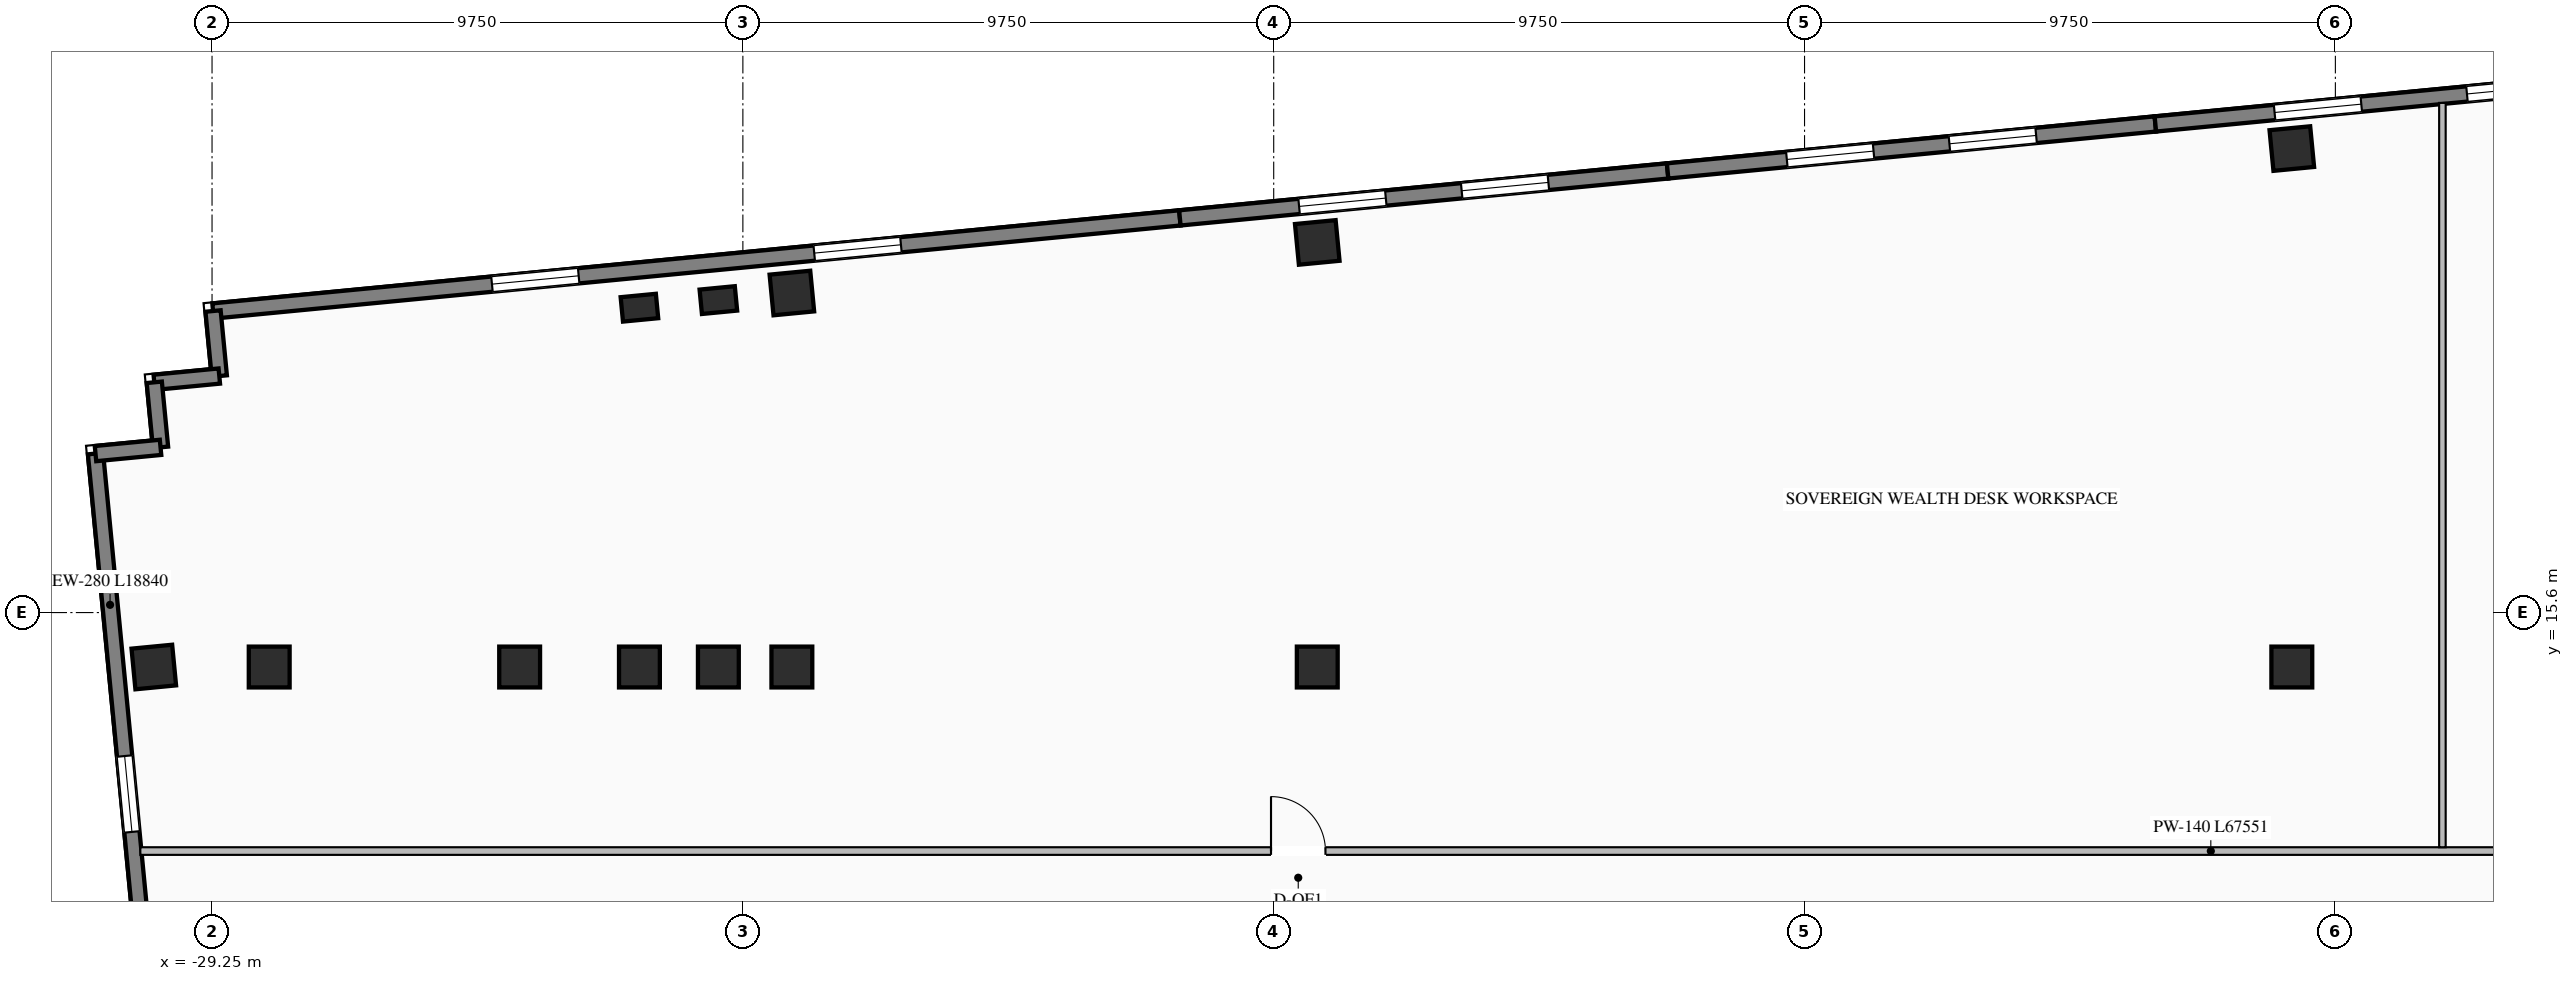
"""IFC4 building model, lengths in metres.
Left out: names, types, materials, properties, quantities, classifications, styles, units other than length and angle.
Written with IfcOpenShell. Run it as: python <this file> out.ifc"""

import sys

from ifc_helpers import new_model, si_unit, direction, frame, frame_2d, origin, origin_2d, place, context, subcontext, project, spatial, rectangle, i_section, extrude, element, fill, save


model = new_model("IFC4")
c1 = context("Model", 3, precision=1e-05, world=origin(), true_north=direction((0.0, 1.0)))
c2 = subcontext(c1, "Body", "Model", "MODEL_VIEW")
j1 = project(units=[si_unit("LENGTHUNIT", "METRE"), si_unit("PLANEANGLEUNIT", "RADIAN")], contexts=[c1])
p1 = place(None, origin())
s1 = spatial("IfcSite", under=j1, at=p1, CompositionType="ELEMENT")
p2 = place(p1, origin())
s2 = spatial("IfcBuilding", under=s1, at=p2, CompositionType="ELEMENT")
p3 = place(p2, frame((0.0, 0.0, 108.7)))
s3 = spatial("IfcBuildingStorey", under=s2, at=p3, CompositionType="ELEMENT", Elevation=108.7)
for number, where, z_axis, x_axis in (
    (1, (-21.4, 14.6, 0.0), (0.0, 0.0, 1.0), (1.0, 0.0, 0.0)),
    (2, (-19.95, 14.6, 0.0), (0.0, 0.0, 1.0), (1.0, 0.0, 0.0)),
    (3, (-18.6, 14.6, 0.0), (0.0, 0.0, 1.0), (1.0, 0.0, 0.0)),
    (4, (-8.95, 14.6, 0.0), (0.0, 0.0, 1.0), (1.0, 0.0, 0.0)),
    (5, (8.95, 14.6, 0.0), (0.0, 0.0, 1.0), (1.0, 0.0, 0.0)),
    (6, (-23.6, 14.6, 0.0), (0.0, 0.0, 1.0), (1.0, 0.0, 0.0)),
    (7, (-28.2, 14.6, 0.0), (0.0, 0.0, 1.0), (1.0, 0.0, 0.0)),
    (8, (-18.6, 21.469, 0.0), (0.0, 0.0, 1.0), (0.995, 0.096, 0.0)),
    (9, (-8.95, 22.398, 0.0), (0.0, 0.0, 1.0), (0.995, 0.096, 0.0)),
    (10, (8.95, 24.122, 0.0), (0.0, 0.0, 1.0), (0.995, 0.096, 0.0)),
    (11, (-30.32, 14.6, 0.0), (0.0, 0.0, 1.0), (0.995, 0.096, 0.0)),
):
    element("IfcColumn", number, at=place(p3, frame(where, z_axis=z_axis, x_axis=x_axis)), inside=s3, PredefinedType="COLUMN", context=c2, shape_type="SweptSolid", body=[
        extrude(i_section(OverallWidth=0.75, OverallDepth=0.75, WebThickness=0.03, FlangeThickness=0.044, at=origin_2d()), origin(), (0.0, 0.0, 1.0), 3.45),
    ])
for number, where, z_axis, x_axis in (
    (12, (-21.4, 21.199, 0.0), (0.0, 0.0, 1.0), (0.995, 0.096, 0.0)),
    (13, (-19.95, 21.339, 0.0), (0.0, 0.0, 1.0), (0.995, 0.096, 0.0)),
):
    element("IfcColumn", number, at=place(p3, frame(where, z_axis=z_axis, x_axis=x_axis)), inside=s3, PredefinedType="PILASTER", context=c2, shape_type="SweptSolid", body=[
        extrude(rectangle(XDim=0.65, YDim=0.45, at=origin_2d()), origin(), (0.0, 0.0, 1.0), 3.45),
    ])
p4 = place(p3, frame((-29.231, 21.138, 0.0), z_axis=(0.0, 0.0, 1.0), x_axis=(0.995395780835, 0.095850088663, 0.0)))
e14 = element("IfcWall", 14, at=p4, inside=s3, PredefinedType="STANDARD", context=c2, shape_type="SweptSolid", body=[
    extrude(rectangle(XDim=17.84, YDim=0.28, at=frame_2d((8.92, 0.0))), origin(), (0.0, 0.0, 1.0), 3.15),
])
p5 = place(p4, frame((5.147, 0.0, 0.76)))
e15 = element("IfcOpeningElement", 15, at=p5, cuts=e14, PredefinedType="OPENING", context=c2, shape_type="SweptSolid", body=[
    extrude(rectangle(XDim=1.6, YDim=1.95, at=frame_2d((0.8, 0.975))), frame((0.0, 0.15, 0.0), z_axis=(0.0, -1.0, 0.0), x_axis=(1.0, 0.0, 0.0)), (0.0, 0.0, 1.0), 0.3),
])
p6 = place(p4, frame((11.093, 0.0, 0.76)))
e16 = element("IfcOpeningElement", 16, at=p6, cuts=e14, PredefinedType="OPENING", context=c2, shape_type="SweptSolid", body=[
    extrude(rectangle(XDim=1.6, YDim=1.95, at=frame_2d((0.8, 0.975))), frame((0.0, 0.15, 0.0), z_axis=(0.0, -1.0, 0.0), x_axis=(1.0, 0.0, 0.0)), (0.0, 0.0, 1.0), 0.3),
])
p7 = place(p3, frame((-11.474, 22.848, 0.0), z_axis=(0.0, 0.0, 1.0), x_axis=(0.995396794462, 0.09583956164, 0.0)))
e17 = element("IfcWall", 17, at=p7, inside=s3, PredefinedType="STANDARD", context=c2, shape_type="SweptSolid", body=[
    extrude(rectangle(XDim=9.0, YDim=0.28, at=frame_2d((4.5, 0.0))), origin(), (0.0, 0.0, 1.0), 3.15),
])
p8 = place(p7, frame((2.2, 0.0, 0.76)))
e18 = element("IfcOpeningElement", 18, at=p8, cuts=e17, PredefinedType="OPENING", context=c2, shape_type="SweptSolid", body=[
    extrude(rectangle(XDim=1.6, YDim=1.95, at=frame_2d((0.8, 0.975))), frame((0.0, 0.15, 0.0), z_axis=(0.0, -1.0, 0.0), x_axis=(1.0, 0.0, 0.0)), (0.0, 0.0, 1.0), 0.3),
])
p9 = place(p7, frame((5.2, 0.0, 0.76)))
e19 = element("IfcOpeningElement", 19, at=p9, cuts=e17, PredefinedType="OPENING", context=c2, shape_type="SweptSolid", body=[
    extrude(rectangle(XDim=1.6, YDim=1.95, at=frame_2d((0.8, 0.975))), frame((0.0, 0.15, 0.0), z_axis=(0.0, -1.0, 0.0), x_axis=(1.0, 0.0, 0.0)), (0.0, 0.0, 1.0), 0.3),
])
p10 = place(p3, frame((-2.515, 23.711, 0.0), z_axis=(0.0, 0.0, 1.0), x_axis=(0.995397043619, 0.095836973841, 0.0)))
e20 = element("IfcWall", 20, at=p10, inside=s3, PredefinedType="STANDARD", context=c2, shape_type="SweptSolid", body=[
    extrude(rectangle(XDim=9.0, YDim=0.28, at=frame_2d((4.5, 0.0))), origin(), (0.0, 0.0, 1.0), 3.15),
])
p11 = place(p10, frame((2.2, 0.0, 0.76)))
e21 = element("IfcOpeningElement", 21, at=p11, cuts=e20, PredefinedType="OPENING", context=c2, shape_type="SweptSolid", body=[
    extrude(rectangle(XDim=1.6, YDim=1.95, at=frame_2d((0.8, 0.975))), frame((0.0, 0.15, 0.0), z_axis=(0.0, -1.0, 0.0), x_axis=(1.0, 0.0, 0.0)), (0.0, 0.0, 1.0), 0.3),
])
p12 = place(p10, frame((5.2, 0.0, 0.76)))
e22 = element("IfcOpeningElement", 22, at=p12, cuts=e20, PredefinedType="OPENING", context=c2, shape_type="SweptSolid", body=[
    extrude(rectangle(XDim=1.6, YDim=1.95, at=frame_2d((0.8, 0.975))), frame((0.0, 0.15, 0.0), z_axis=(0.0, -1.0, 0.0), x_axis=(1.0, 0.0, 0.0)), (0.0, 0.0, 1.0), 0.3),
])
p13 = place(p3, frame((6.444, 24.573, 0.0), z_axis=(0.0, 0.0, 1.0), x_axis=(0.995396794462, 0.09583956164, 0.0)))
e23 = element("IfcWall", 23, at=p13, inside=s3, PredefinedType="STANDARD", context=c2, shape_type="SweptSolid", body=[
    extrude(rectangle(XDim=9.0, YDim=0.28, at=frame_2d((4.5, 0.0))), origin(), (0.0, 0.0, 1.0), 3.15),
])
p14 = place(p13, frame((2.2, 0.0, 0.76)))
e24 = element("IfcOpeningElement", 24, at=p14, cuts=e23, PredefinedType="OPENING", context=c2, shape_type="SweptSolid", body=[
    extrude(rectangle(XDim=1.6, YDim=1.95, at=frame_2d((0.8, 0.975))), frame((0.0, 0.15, 0.0), z_axis=(0.0, -1.0, 0.0), x_axis=(1.0, 0.0, 0.0)), (0.0, 0.0, 1.0), 0.3),
])
p15 = place(p13, frame((5.75, 0.0, 0.76)))
e25 = element("IfcOpeningElement", 25, at=p15, cuts=e23, PredefinedType="OPENING", context=c2, shape_type="SweptSolid", body=[
    extrude(rectangle(XDim=1.6, YDim=1.95, at=frame_2d((0.8, 0.975))), frame((0.0, 0.15, 0.0), z_axis=(0.0, -1.0, 0.0), x_axis=(1.0, 0.0, 0.0)), (0.0, 0.0, 1.0), 0.3),
])
p16 = place(p3, frame((-29.585, -0.234, 0.0), z_axis=(0.0, 0.0, 1.0), x_axis=(-0.095841297881, 0.99539662729, 0.0)))
e26 = element("IfcWall", 26, at=p16, inside=s3, PredefinedType="STANDARD", context=c2, shape_type="SweptSolid", body=[
    extrude(rectangle(XDim=18.84, YDim=0.28, at=frame_2d((9.42, 0.0))), origin(), (0.0, 0.0, 1.0), 3.15),
])
p17 = place(p16, frame((5.58, 0.0, 0.76)))
e27 = element("IfcOpeningElement", 27, at=p17, cuts=e26, PredefinedType="OPENING", context=c2, shape_type="SweptSolid", body=[
    extrude(rectangle(XDim=1.4, YDim=1.95, at=frame_2d((0.7, 0.975))), frame((0.0, 0.15, 0.0), z_axis=(0.0, -1.0, 0.0), x_axis=(1.0, 0.0, 0.0)), (0.0, 0.0, 1.0), 0.3),
])
p18 = place(p16, frame((11.86, 0.0, 0.76)))
e28 = element("IfcOpeningElement", 28, at=p18, cuts=e26, PredefinedType="OPENING", context=c2, shape_type="SweptSolid", body=[
    extrude(rectangle(XDim=1.4, YDim=1.95, at=frame_2d((0.7, 0.975))), frame((0.0, 0.15, 0.0), z_axis=(0.0, -1.0, 0.0), x_axis=(1.0, 0.0, 0.0)), (0.0, 0.0, 1.0), 0.3),
])
for number, where, z_axis, x_axis in (
    (29, (-29.231, 21.138, 0.0), (0.0, 0.0, 1.0), (0.096, -0.995, 0.0)),
    (30, (-29.116, 19.944, 0.0), (0.0, 0.0, 1.0), (-0.995, -0.096, 0.0)),
):
    element("IfcWall", number, at=place(p3, frame(where, z_axis=z_axis, x_axis=x_axis)), inside=s3, PredefinedType="STANDARD", context=c2, shape_type="SweptSolid", body=[
        extrude(rectangle(XDim=1.2, YDim=0.28, at=frame_2d((0.6, 0.0))), origin(), (0.0, 0.0, 1.0), 3.15),
    ])
for number, where, z_axis, x_axis in (
    (31, (-30.311, 19.829, 0.0), (0.0, 0.0, 1.0), (0.096, -0.995, 0.0)),
    (32, (-30.196, 18.635, 0.0), (0.0, 0.0, 1.0), (-0.995, -0.096, 0.0)),
):
    element("IfcWall", number, at=place(p3, frame(where, z_axis=z_axis, x_axis=x_axis)), inside=s3, PredefinedType="STANDARD", context=c2, shape_type="SweptSolid", body=[
        extrude(rectangle(XDim=1.2, YDim=0.28, at=frame_2d((0.6, 0.0))), origin(), (0.0, 0.0, 1.0), 3.15),
    ])
p19 = place(p3, frame((-30.567, 11.22, 0.0), z_axis=(0.0, 0.0, 1.0), x_axis=(1.0, 0.0, 0.0)))
e33 = element("IfcWall", 33, at=p19, inside=s3, PredefinedType="STANDARD", context=c2, shape_type="SweptSolid", body=[
    extrude(rectangle(XDim=67.551, YDim=0.14, at=frame_2d((33.775, 0.0))), origin(), (0.0, 0.0, 1.0), 3.15),
])
p20 = place(p19, frame((20.768, 0.0, 0.0)))
e34 = element("IfcOpeningElement", 34, at=p20, cuts=e33, PredefinedType="OPENING", context=c2, shape_type="SweptSolid", body=[
    extrude(rectangle(XDim=1.0, YDim=2.08, at=frame_2d((0.5, 1.04))), frame((0.0, 0.08, 0.0), z_axis=(0.0, -1.0, 0.0), x_axis=(1.0, 0.0, 0.0)), (0.0, 0.0, 1.0), 0.16),
])
p21 = place(p19, frame((54.291, 0.0, 0.0)))
e35 = element("IfcOpeningElement", 35, at=p21, cuts=e33, PredefinedType="OPENING", context=c2, shape_type="SweptSolid", body=[
    extrude(rectangle(XDim=1.0, YDim=2.08, at=frame_2d((0.5, 1.04))), frame((0.0, 0.08, 0.0), z_axis=(0.0, -1.0, 0.0), x_axis=(1.0, 0.0, 0.0)), (0.0, 0.0, 1.0), 0.16),
])
p22 = place(p3, frame((11.716, 11.29, 0.0), z_axis=(0.0, 0.0, 1.0), x_axis=(0.0, 1.0, 0.0)))
e36 = element("IfcWall", 36, at=p22, inside=s3, PredefinedType="STANDARD", context=c2, shape_type="SweptSolid", body=[
    extrude(rectangle(XDim=13.671, YDim=0.12, at=frame_2d((6.835, 0.0))), origin(), (0.0, 0.0, 1.0), 3.15),
])
p23 = place(p5, origin())
e37 = element("IfcWindow", 37, at=p23, inside=s3, PartitioningType="SINGLE_PANEL", PredefinedType="WINDOW", context=c2, shape_type="SweptSolid", body=[
    extrude(rectangle(XDim=1.6, YDim=1.95, at=frame_2d((0.8, 0.975))), frame((0.0, 0.03, 0.0), z_axis=(0.0, -1.0, 0.0), x_axis=(1.0, 0.0, 0.0)), (0.0, 0.0, 1.0), 0.06),
])
fill(e15, e37)
p24 = place(p6, origin())
e38 = element("IfcWindow", 38, at=p24, inside=s3, PartitioningType="SINGLE_PANEL", PredefinedType="WINDOW", context=c2, shape_type="SweptSolid", body=[
    extrude(rectangle(XDim=1.6, YDim=1.95, at=frame_2d((0.8, 0.975))), frame((0.0, 0.03, 0.0), z_axis=(0.0, -1.0, 0.0), x_axis=(1.0, 0.0, 0.0)), (0.0, 0.0, 1.0), 0.06),
])
fill(e16, e38)
p25 = place(p8, origin())
e39 = element("IfcWindow", 39, at=p25, inside=s3, PartitioningType="SINGLE_PANEL", PredefinedType="WINDOW", context=c2, shape_type="SweptSolid", body=[
    extrude(rectangle(XDim=1.6, YDim=1.95, at=frame_2d((0.8, 0.975))), frame((0.0, 0.03, 0.0), z_axis=(0.0, -1.0, 0.0), x_axis=(1.0, 0.0, 0.0)), (0.0, 0.0, 1.0), 0.06),
])
fill(e18, e39)
p26 = place(p9, origin())
e40 = element("IfcWindow", 40, at=p26, inside=s3, PartitioningType="SINGLE_PANEL", PredefinedType="WINDOW", context=c2, shape_type="SweptSolid", body=[
    extrude(rectangle(XDim=1.6, YDim=1.95, at=frame_2d((0.8, 0.975))), frame((0.0, 0.03, 0.0), z_axis=(0.0, -1.0, 0.0), x_axis=(1.0, 0.0, 0.0)), (0.0, 0.0, 1.0), 0.06),
])
fill(e19, e40)
p27 = place(p11, origin())
e41 = element("IfcWindow", 41, at=p27, inside=s3, PartitioningType="SINGLE_PANEL", PredefinedType="WINDOW", context=c2, shape_type="SweptSolid", body=[
    extrude(rectangle(XDim=1.6, YDim=1.95, at=frame_2d((0.8, 0.975))), frame((0.0, 0.03, 0.0), z_axis=(0.0, -1.0, 0.0), x_axis=(1.0, 0.0, 0.0)), (0.0, 0.0, 1.0), 0.06),
])
fill(e21, e41)
p28 = place(p12, origin())
e42 = element("IfcWindow", 42, at=p28, inside=s3, PartitioningType="SINGLE_PANEL", PredefinedType="WINDOW", context=c2, shape_type="SweptSolid", body=[
    extrude(rectangle(XDim=1.6, YDim=1.95, at=frame_2d((0.8, 0.975))), frame((0.0, 0.03, 0.0), z_axis=(0.0, -1.0, 0.0), x_axis=(1.0, 0.0, 0.0)), (0.0, 0.0, 1.0), 0.06),
])
fill(e22, e42)
p29 = place(p14, origin())
e43 = element("IfcWindow", 43, at=p29, inside=s3, PartitioningType="SINGLE_PANEL", PredefinedType="WINDOW", context=c2, shape_type="SweptSolid", body=[
    extrude(rectangle(XDim=1.6, YDim=1.95, at=frame_2d((0.8, 0.975))), frame((0.0, 0.03, 0.0), z_axis=(0.0, -1.0, 0.0), x_axis=(1.0, 0.0, 0.0)), (0.0, 0.0, 1.0), 0.06),
])
fill(e24, e43)
p30 = place(p15, origin())
e44 = element("IfcWindow", 44, at=p30, inside=s3, PartitioningType="SINGLE_PANEL", PredefinedType="WINDOW", context=c2, shape_type="SweptSolid", body=[
    extrude(rectangle(XDim=1.6, YDim=1.95, at=frame_2d((0.8, 0.975))), frame((0.0, 0.03, 0.0), z_axis=(0.0, -1.0, 0.0), x_axis=(1.0, 0.0, 0.0)), (0.0, 0.0, 1.0), 0.06),
])
fill(e25, e44)
p31 = place(p18, origin())
e45 = element("IfcWindow", 45, at=p31, inside=s3, PartitioningType="SINGLE_PANEL", PredefinedType="WINDOW", context=c2, shape_type="SweptSolid", body=[
    extrude(rectangle(XDim=1.4, YDim=1.95, at=frame_2d((0.7, 0.975))), frame((0.0, 0.03, 0.0), z_axis=(0.0, -1.0, 0.0), x_axis=(1.0, 0.0, 0.0)), (0.0, 0.0, 1.0), 0.06),
])
fill(e28, e45)
p32 = place(p20, origin())
e46 = element("IfcDoor", 46, at=p32, inside=s3, OperationType="SINGLE_SWING_LEFT", PredefinedType="DOOR", context=c2, shape_type="SweptSolid", body=[
    extrude(rectangle(XDim=1.0, YDim=2.08, at=frame_2d((0.5, 1.04))), frame((0.0, 0.025, 0.0), z_axis=(0.0, -1.0, 0.0), x_axis=(1.0, 0.0, 0.0)), (0.0, 0.0, 1.0), 0.05),
])
fill(e34, e46)
save(model, sys.argv[1])
